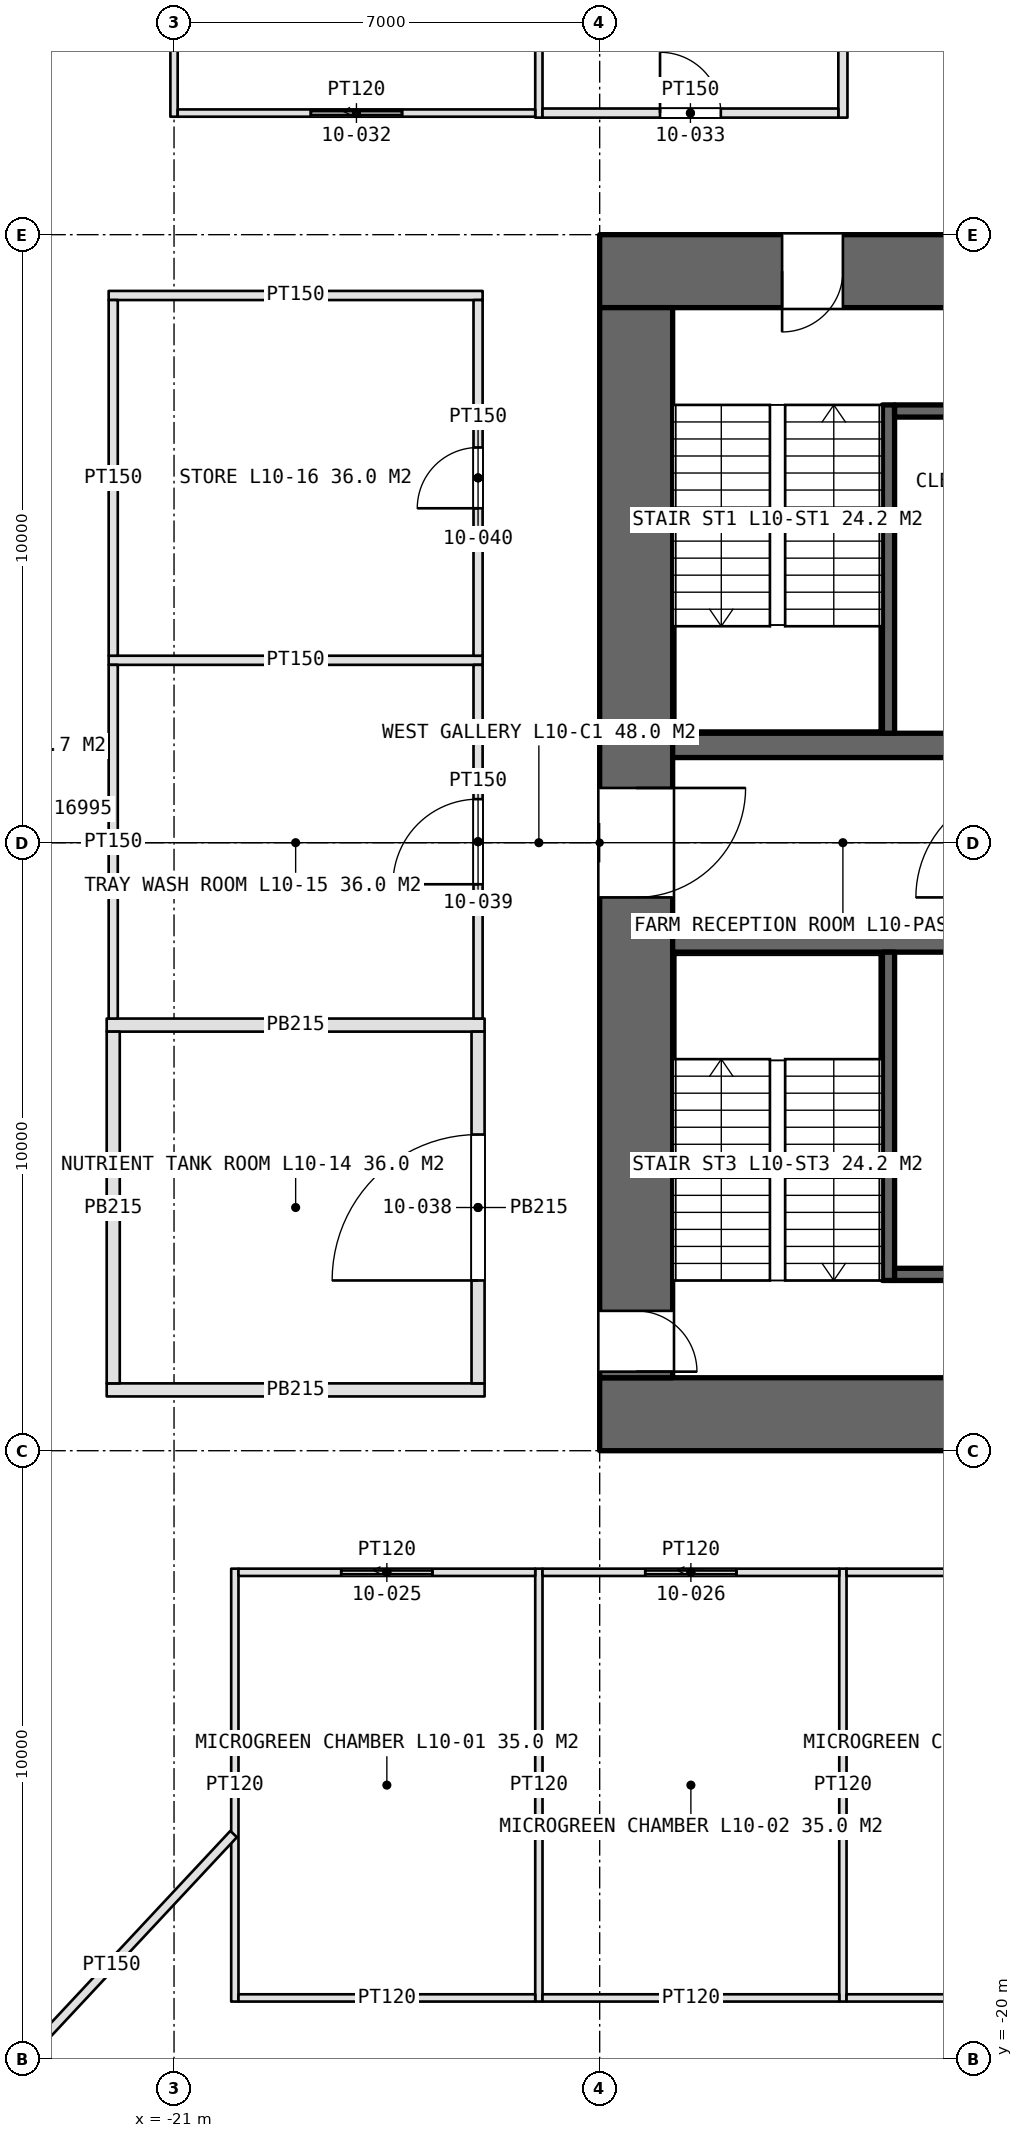
"""IFC4 building model, lengths in metres.
Left out: names, types, materials, properties, quantities, classifications, styles, units other than length and angle.
Written with IfcOpenShell. Run it as: python <this file> out.ifc"""

import sys

from ifc_helpers import new_model, si_unit, direction, frame, frame_2d, origin, place, context, subcontext, project, spatial, rectangle, extrude, element, fill, save


model = new_model("IFC4")
c1 = context("Model", 3, precision=1e-05, world=origin(), true_north=direction((0.0, 1.0)))
c2 = subcontext(c1, "Body", "Model", "MODEL_VIEW")
j1 = project(units=[si_unit("LENGTHUNIT", "METRE"), si_unit("PLANEANGLEUNIT", "RADIAN")], contexts=[c1])
p1 = place(None, origin())
s1 = spatial("IfcSite", under=j1, at=p1, CompositionType="ELEMENT")
p2 = place(p1, origin())
s2 = spatial("IfcBuilding", under=s1, at=p2, CompositionType="ELEMENT")
p3 = place(p2, frame((0.0, 0.0, 50.0)))
s3 = spatial("IfcBuildingStorey", under=s2, at=p3, CompositionType="ELEMENT", Elevation=50.0)
p4 = place(p3, frame((-14.0, -9.4, 0.0), z_axis=(0.0, 0.0, 1.0), x_axis=(1.0, 0.0, 0.0)))
e1 = element("IfcWall", 1, at=p4, inside=s3, PredefinedType="SHEAR", context=c2, shape_type="SweptSolid", body=[
    extrude(rectangle(XDim=28.0, YDim=1.2, at=frame_2d((14.0, 0.0))), origin(), (0.0, 0.0, 1.0), 5.0),
])
p5 = place(p4, frame((13.1, 0.0, 0.0)))
e2 = element("IfcOpeningElement", 2, at=p5, cuts=e1, PredefinedType="OPENING", context=c2, shape_type="SweptSolid", body=[
    extrude(rectangle(XDim=1.8, YDim=2.4, at=frame_2d((0.9, 1.2))), frame((0.0, 0.61, 0.0), z_axis=(0.0, -1.0, 0.0), x_axis=(1.0, 0.0, 0.0)), (0.0, 0.0, 1.0), 1.22),
])
p6 = place(p4, frame((22.9, 0.0, 0.0)))
e3 = element("IfcOpeningElement", 3, at=p6, cuts=e1, PredefinedType="OPENING", context=c2, shape_type="SweptSolid", body=[
    extrude(rectangle(XDim=2.2, YDim=2.7, at=frame_2d((1.1, 1.35))), frame((0.0, 0.61, 0.0), z_axis=(0.0, -1.0, 0.0), x_axis=(1.0, 0.0, 0.0)), (0.0, 0.0, 1.0), 1.22),
])
p7 = place(p3, frame((14.0, 9.4, 0.0), z_axis=(0.0, 0.0, 1.0), x_axis=(-1.0, 0.0, 0.0)))
e4 = element("IfcWall", 4, at=p7, inside=s3, PredefinedType="SHEAR", context=c2, shape_type="SweptSolid", body=[
    extrude(rectangle(XDim=28.0, YDim=1.2, at=frame_2d((14.0, 0.0))), origin(), (0.0, 0.0, 1.0), 5.0),
])
p8 = place(p7, frame((24.0, 0.0, 0.0)))
e5 = element("IfcOpeningElement", 5, at=p8, cuts=e4, PredefinedType="OPENING", context=c2, shape_type="SweptSolid", body=[
    extrude(rectangle(XDim=1.0, YDim=2.4, at=frame_2d((0.5, 1.2))), frame((0.0, 0.61, 0.0), z_axis=(0.0, -1.0, 0.0), x_axis=(1.0, 0.0, 0.0)), (0.0, 0.0, 1.0), 1.22),
])
p9 = place(p7, frame((13.1, 0.0, 0.0)))
e6 = element("IfcOpeningElement", 6, at=p9, cuts=e4, PredefinedType="OPENING", context=c2, shape_type="SweptSolid", body=[
    extrude(rectangle(XDim=1.8, YDim=2.4, at=frame_2d((0.9, 1.2))), frame((0.0, 0.61, 0.0), z_axis=(0.0, -1.0, 0.0), x_axis=(1.0, 0.0, 0.0)), (0.0, 0.0, 1.0), 1.22),
])
p10 = place(p3, frame((-13.4, 8.8, 0.0), z_axis=(0.0, 0.0, 1.0), x_axis=(0.0, -1.0, 0.0)))
e7 = element("IfcWall", 7, at=p10, inside=s3, PredefinedType="SHEAR", context=c2, shape_type="SweptSolid", body=[
    extrude(rectangle(XDim=17.6, YDim=1.2, at=frame_2d((8.8, 0.0))), origin(), (0.0, 0.0, 1.0), 5.0),
])
p11 = place(p10, frame((7.9, 0.0, 0.0)))
e8 = element("IfcOpeningElement", 8, at=p11, cuts=e7, PredefinedType="OPENING", context=c2, shape_type="SweptSolid", body=[
    extrude(rectangle(XDim=1.8, YDim=2.4, at=frame_2d((0.9, 1.2))), frame((0.0, 0.61, 0.0), z_axis=(0.0, -1.0, 0.0), x_axis=(1.0, 0.0, 0.0)), (0.0, 0.0, 1.0), 1.22),
])
p12 = place(p10, frame((16.5, 0.0, 0.0)))
e9 = element("IfcOpeningElement", 9, at=p12, cuts=e7, PredefinedType="OPENING", context=c2, shape_type="SweptSolid", body=[
    extrude(rectangle(XDim=1.0, YDim=2.4, at=frame_2d((0.5, 1.2))), frame((0.0, 0.61, 0.0), z_axis=(0.0, -1.0, 0.0), x_axis=(1.0, 0.0, 0.0)), (0.0, 0.0, 1.0), 1.22),
])
for number, where, z_axis, x_axis in (
    (10, (-12.8, 1.6, 0.0), (0.0, 0.0, 1.0), (1.0, 0.0, 0.0)),
    (11, (-12.8, -1.6, 0.0), (0.0, 0.0, 1.0), (1.0, 0.0, 0.0)),
):
    element("IfcWall", number, at=place(p3, frame(where, z_axis=z_axis, x_axis=x_axis)), inside=s3, PredefinedType="SHEAR", context=c2, shape_type="SweptSolid", body=[
        extrude(rectangle(XDim=5.6, YDim=0.4, at=frame_2d((2.8, 0.0))), origin(), (0.0, 0.0, 1.0), 5.0),
    ])
p13 = place(p3, frame((-9.25, 7.2, 0.0), z_axis=(0.0, 0.0, 1.0), x_axis=(0.0, -1.0, 0.0)))
e12 = element("IfcWall", 12, at=p13, inside=s3, PredefinedType="SOLIDWALL", context=c2, shape_type="SweptSolid", body=[
    extrude(rectangle(XDim=5.4, YDim=0.2, at=frame_2d((2.7, 0.0))), origin(), (0.0, 0.0, 1.0), 5.0),
])
p14 = place(p3, frame((-9.15, 7.1, 0.0), z_axis=(0.0, 0.0, 1.0), x_axis=(1.0, 0.0, 0.0)))
e13 = element("IfcWall", 13, at=p14, inside=s3, PredefinedType="SOLIDWALL", context=c2, shape_type="SweptSolid", body=[
    extrude(rectangle(XDim=1.95, YDim=0.2, at=frame_2d((0.975, 0.0))), origin(), (0.0, 0.0, 1.0), 5.0),
])
p15 = place(p3, frame((-9.25, -7.2, 0.0), z_axis=(0.0, 0.0, 1.0), x_axis=(0.0, 1.0, 0.0)))
e14 = element("IfcWall", 14, at=p15, inside=s3, PredefinedType="SOLIDWALL", context=c2, shape_type="SweptSolid", body=[
    extrude(rectangle(XDim=5.4, YDim=0.2, at=frame_2d((2.7, 0.0))), origin(), (0.0, 0.0, 1.0), 5.0),
])
p16 = place(p3, frame((-9.15, -7.1, 0.0), z_axis=(0.0, 0.0, 1.0), x_axis=(1.0, 0.0, 0.0)))
e15 = element("IfcWall", 15, at=p16, inside=s3, PredefinedType="SOLIDWALL", context=c2, shape_type="SweptSolid", body=[
    extrude(rectangle(XDim=1.95, YDim=0.2, at=frame_2d((0.975, 0.0))), origin(), (0.0, 0.0, 1.0), 5.0),
])
for number, where, z_axis, x_axis in (
    (16, (-20.0, -11.94, 0.0), (0.0, 0.0, 1.0), (0.0, -1.0, 0.0)),
    (17, (-15.0, -11.94, 0.0), (0.0, 0.0, 1.0), (0.0, -1.0, 0.0)),
    (18, (-10.0, -11.94, 0.0), (0.0, 0.0, 1.0), (0.0, -1.0, 0.0)),
):
    element("IfcWall", number, at=place(p3, frame(where, z_axis=z_axis, x_axis=x_axis)), inside=s3, PredefinedType="PARTITIONING", context=c2, shape_type="SweptSolid", body=[
        extrude(rectangle(XDim=7.12, YDim=0.12, at=frame_2d((3.56, 0.0))), origin(), (0.0, 0.0, 1.0), 3.6),
    ])
p17 = place(p3, frame((-19.94, -12.0, 0.0), z_axis=(0.0, 0.0, 1.0), x_axis=(1.0, 0.0, 0.0)))
e19 = element("IfcWall", 19, at=p17, inside=s3, PredefinedType="PARTITIONING", context=c2, shape_type="SweptSolid", body=[
    extrude(rectangle(XDim=4.88, YDim=0.12, at=frame_2d((2.44, 0.0))), origin(), (0.0, 0.0, 1.0), 3.6),
])
p18 = place(p17, frame((1.69, 0.0, 0.0)))
e20 = element("IfcOpeningElement", 20, at=p18, cuts=e19, PredefinedType="OPENING", context=c2, shape_type="SweptSolid", body=[
    extrude(rectangle(XDim=1.5, YDim=2.5, at=frame_2d((0.75, 1.25))), frame((0.0, 0.07, 0.0), z_axis=(0.0, -1.0, 0.0), x_axis=(1.0, 0.0, 0.0)), (0.0, 0.0, 1.0), 0.14),
])
p19 = place(p3, frame((-19.94, -19.0, 0.0), z_axis=(0.0, 0.0, 1.0), x_axis=(1.0, 0.0, 0.0)))
e21 = element("IfcWall", 21, at=p19, inside=s3, PredefinedType="PARTITIONING", context=c2, shape_type="SweptSolid", body=[
    extrude(rectangle(XDim=4.88, YDim=0.12, at=frame_2d((2.44, 0.0))), origin(), (0.0, 0.0, 1.0), 3.6),
])
p20 = place(p3, frame((-14.94, -12.0, 0.0), z_axis=(0.0, 0.0, 1.0), x_axis=(1.0, 0.0, 0.0)))
e22 = element("IfcWall", 22, at=p20, inside=s3, PredefinedType="PARTITIONING", context=c2, shape_type="SweptSolid", body=[
    extrude(rectangle(XDim=4.88, YDim=0.12, at=frame_2d((2.44, 0.0))), origin(), (0.0, 0.0, 1.0), 3.6),
])
p21 = place(p20, frame((1.69, 0.0, 0.0)))
e23 = element("IfcOpeningElement", 23, at=p21, cuts=e22, PredefinedType="OPENING", context=c2, shape_type="SweptSolid", body=[
    extrude(rectangle(XDim=1.5, YDim=2.5, at=frame_2d((0.75, 1.25))), frame((0.0, 0.07, 0.0), z_axis=(0.0, -1.0, 0.0), x_axis=(1.0, 0.0, 0.0)), (0.0, 0.0, 1.0), 0.14),
])
p22 = place(p3, frame((-14.94, -19.0, 0.0), z_axis=(0.0, 0.0, 1.0), x_axis=(1.0, 0.0, 0.0)))
e24 = element("IfcWall", 24, at=p22, inside=s3, PredefinedType="PARTITIONING", context=c2, shape_type="SweptSolid", body=[
    extrude(rectangle(XDim=4.88, YDim=0.12, at=frame_2d((2.44, 0.0))), origin(), (0.0, 0.0, 1.0), 3.6),
])
p23 = place(p3, frame((-9.94, -12.0, 0.0), z_axis=(0.0, 0.0, 1.0), x_axis=(1.0, 0.0, 0.0)))
e25 = element("IfcWall", 25, at=p23, inside=s3, PredefinedType="PARTITIONING", context=c2, shape_type="SweptSolid", body=[
    extrude(rectangle(XDim=4.88, YDim=0.12, at=frame_2d((2.44, 0.0))), origin(), (0.0, 0.0, 1.0), 3.6),
])
p24 = place(p23, frame((1.69, 0.0, 0.0)))
e26 = element("IfcOpeningElement", 26, at=p24, cuts=e25, PredefinedType="OPENING", context=c2, shape_type="SweptSolid", body=[
    extrude(rectangle(XDim=1.5, YDim=2.5, at=frame_2d((0.75, 1.25))), frame((0.0, 0.07, 0.0), z_axis=(0.0, -1.0, 0.0), x_axis=(1.0, 0.0, 0.0)), (0.0, 0.0, 1.0), 0.14),
])
p25 = place(p3, frame((-9.94, -19.0, 0.0), z_axis=(0.0, 0.0, 1.0), x_axis=(1.0, 0.0, 0.0)))
e27 = element("IfcWall", 27, at=p25, inside=s3, PredefinedType="PARTITIONING", context=c2, shape_type="SweptSolid", body=[
    extrude(rectangle(XDim=4.88, YDim=0.12, at=frame_2d((2.44, 0.0))), origin(), (0.0, 0.0, 1.0), 3.6),
])
p26 = place(p3, frame((-21.0, 11.94, 0.0), z_axis=(0.0, 0.0, 1.0), x_axis=(0.0, 1.0, 0.0)))
e28 = element("IfcWall", 28, at=p26, inside=s3, PredefinedType="PARTITIONING", context=c2, shape_type="SweptSolid", body=[
    extrude(rectangle(XDim=6.12, YDim=0.12, at=frame_2d((3.06, 0.0))), origin(), (0.0, 0.0, 1.0), 3.6),
])
p27 = place(p3, frame((-15.0, 11.925, 0.0), z_axis=(0.0, 0.0, 1.0), x_axis=(0.0, 1.0, 0.0)))
e29 = element("IfcWall", 29, at=p27, inside=s3, PredefinedType="PARTITIONING", context=c2, shape_type="SweptSolid", body=[
    extrude(rectangle(XDim=6.15, YDim=0.12, at=frame_2d((3.075, 0.0))), origin(), (0.0, 0.0, 1.0), 3.6),
])
p28 = place(p3, frame((-10.0, 11.925, 0.0), z_axis=(0.0, 0.0, 1.0), x_axis=(0.0, 1.0, 0.0)))
e30 = element("IfcWall", 30, at=p28, inside=s3, PredefinedType="PARTITIONING", context=c2, shape_type="SweptSolid", body=[
    extrude(rectangle(XDim=6.15, YDim=0.15, at=frame_2d((3.075, 0.0))), origin(), (0.0, 0.0, 1.0), 3.6),
])
p29 = place(p3, frame((-20.94, 12.0, 0.0), z_axis=(0.0, 0.0, 1.0), x_axis=(1.0, 0.0, 0.0)))
e31 = element("IfcWall", 31, at=p29, inside=s3, PredefinedType="PARTITIONING", context=c2, shape_type="SweptSolid", body=[
    extrude(rectangle(XDim=5.88, YDim=0.12, at=frame_2d((2.94, 0.0))), origin(), (0.0, 0.0, 1.0), 3.6),
])
p30 = place(p29, frame((2.19, 0.0, 0.0)))
e32 = element("IfcOpeningElement", 32, at=p30, cuts=e31, PredefinedType="OPENING", context=c2, shape_type="SweptSolid", body=[
    extrude(rectangle(XDim=1.5, YDim=2.5, at=frame_2d((0.75, 1.25))), frame((0.0, 0.07, 0.0), z_axis=(0.0, -1.0, 0.0), x_axis=(1.0, 0.0, 0.0)), (0.0, 0.0, 1.0), 0.14),
])
p31 = place(p3, frame((-14.94, 12.0, 0.0), z_axis=(0.0, 0.0, 1.0), x_axis=(1.0, 0.0, 0.0)))
e33 = element("IfcWall", 33, at=p31, inside=s3, PredefinedType="PARTITIONING", context=c2, shape_type="SweptSolid", body=[
    extrude(rectangle(XDim=4.865, YDim=0.15, at=frame_2d((2.433, 0.0))), origin(), (0.0, 0.0, 1.0), 3.6),
])
p32 = place(p31, frame((1.933, 0.0, 0.0)))
e34 = element("IfcOpeningElement", 34, at=p32, cuts=e33, PredefinedType="OPENING", context=c2, shape_type="SweptSolid", body=[
    extrude(rectangle(XDim=1.0, YDim=2.2, at=frame_2d((0.5, 1.1))), frame((0.0, 0.085, 0.0), z_axis=(0.0, -1.0, 0.0), x_axis=(1.0, 0.0, 0.0)), (0.0, 0.0, 1.0), 0.17),
])
for number, where, z_axis, x_axis in (
    (35, (-15.893, -9.0, 0.0), (0.0, 0.0, 1.0), (-1.0, 0.0, 0.0)),
    (36, (-15.893, -3.0, 0.0), (0.0, 0.0, 1.0), (-1.0, 0.0, 0.0)),
):
    element("IfcWall", number, at=place(p3, frame(where, z_axis=z_axis, x_axis=x_axis)), inside=s3, PredefinedType="PARTITIONING", context=c2, shape_type="SweptSolid", body=[
        extrude(rectangle(XDim=6.215, YDim=0.215, at=frame_2d((3.107, 0.0))), origin(), (0.0, 0.0, 1.0), 3.6),
    ])
for number, where, z_axis, x_axis in (
    (37, (-15.925, 3.0, 0.0), (0.0, 0.0, 1.0), (-1.0, 0.0, 0.0)),
    (38, (-15.925, 9.0, 0.0), (0.0, 0.0, 1.0), (-1.0, 0.0, 0.0)),
):
    element("IfcWall", number, at=place(p3, frame(where, z_axis=z_axis, x_axis=x_axis)), inside=s3, PredefinedType="PARTITIONING", context=c2, shape_type="SweptSolid", body=[
        extrude(rectangle(XDim=6.15, YDim=0.15, at=frame_2d((3.075, 0.0))), origin(), (0.0, 0.0, 1.0), 3.6),
    ])
p33 = place(p3, frame((-16.0, -8.893, 0.0), z_axis=(0.0, 0.0, 1.0), x_axis=(0.0, 1.0, 0.0)))
e39 = element("IfcWall", 39, at=p33, inside=s3, PredefinedType="PARTITIONING", context=c2, shape_type="SweptSolid", body=[
    extrude(rectangle(XDim=5.785, YDim=0.215, at=frame_2d((2.893, 0.0))), origin(), (0.0, 0.0, 1.0), 3.6),
])
p34 = place(p33, frame((1.692, 0.0, 0.0)))
e40 = element("IfcOpeningElement", 40, at=p34, cuts=e39, PredefinedType="OPENING", context=c2, shape_type="SweptSolid", body=[
    extrude(rectangle(XDim=2.4, YDim=2.4, at=frame_2d((1.2, 1.2))), frame((0.0, 0.118, 0.0), z_axis=(0.0, -1.0, 0.0), x_axis=(1.0, 0.0, 0.0)), (0.0, 0.0, 1.0), 0.235),
])
p35 = place(p3, frame((-22.0, -8.893, 0.0), z_axis=(0.0, 0.0, 1.0), x_axis=(0.0, 1.0, 0.0)))
e41 = element("IfcWall", 41, at=p35, inside=s3, PredefinedType="PARTITIONING", context=c2, shape_type="SweptSolid", body=[
    extrude(rectangle(XDim=5.785, YDim=0.215, at=frame_2d((2.893, 0.0))), origin(), (0.0, 0.0, 1.0), 3.6),
])
p36 = place(p3, frame((-16.0, -2.893, 0.0), z_axis=(0.0, 0.0, 1.0), x_axis=(0.0, 1.0, 0.0)))
e42 = element("IfcWall", 42, at=p36, inside=s3, PredefinedType="PARTITIONING", context=c2, shape_type="SweptSolid", body=[
    extrude(rectangle(XDim=5.818, YDim=0.15, at=frame_2d((2.909, 0.0))), origin(), (0.0, 0.0, 1.0), 3.6),
])
p37 = place(p36, frame((2.209, 0.0, 0.0)))
e43 = element("IfcOpeningElement", 43, at=p37, cuts=e42, PredefinedType="OPENING", context=c2, shape_type="SweptSolid", body=[
    extrude(rectangle(XDim=1.4, YDim=2.4, at=frame_2d((0.7, 1.2))), frame((0.0, 0.085, 0.0), z_axis=(0.0, -1.0, 0.0), x_axis=(1.0, 0.0, 0.0)), (0.0, 0.0, 1.0), 0.17),
])
p38 = place(p3, frame((-22.0, -2.893, 0.0), z_axis=(0.0, 0.0, 1.0), x_axis=(0.0, 1.0, 0.0)))
e44 = element("IfcWall", 44, at=p38, inside=s3, PredefinedType="PARTITIONING", context=c2, shape_type="SweptSolid", body=[
    extrude(rectangle(XDim=5.818, YDim=0.15, at=frame_2d((2.909, 0.0))), origin(), (0.0, 0.0, 1.0), 3.6),
])
p39 = place(p3, frame((-16.0, 3.075, 0.0), z_axis=(0.0, 0.0, 1.0), x_axis=(0.0, 1.0, 0.0)))
e45 = element("IfcWall", 45, at=p39, inside=s3, PredefinedType="PARTITIONING", context=c2, shape_type="SweptSolid", body=[
    extrude(rectangle(XDim=5.85, YDim=0.15, at=frame_2d((2.925, 0.0))), origin(), (0.0, 0.0, 1.0), 3.6),
])
p40 = place(p39, frame((2.425, 0.0, 0.0)))
e46 = element("IfcOpeningElement", 46, at=p40, cuts=e45, PredefinedType="OPENING", context=c2, shape_type="SweptSolid", body=[
    extrude(rectangle(XDim=1.0, YDim=2.2, at=frame_2d((0.5, 1.1))), frame((0.0, 0.085, 0.0), z_axis=(0.0, -1.0, 0.0), x_axis=(1.0, 0.0, 0.0)), (0.0, 0.0, 1.0), 0.17),
])
p41 = place(p3, frame((-22.0, 3.075, 0.0), z_axis=(0.0, 0.0, 1.0), x_axis=(0.0, 1.0, 0.0)))
e47 = element("IfcWall", 47, at=p41, inside=s3, PredefinedType="PARTITIONING", context=c2, shape_type="SweptSolid", body=[
    extrude(rectangle(XDim=5.85, YDim=0.15, at=frame_2d((2.925, 0.0))), origin(), (0.0, 0.0, 1.0), 3.6),
])
p42 = place(p3, frame((-20.02, -16.305, 0.0), z_axis=(0.0, 0.0, 1.0), x_axis=(-0.682516386928, -0.730870290527, 0.0)))
e48 = element("IfcWall", 48, at=p42, inside=s3, PredefinedType="PARTITIONING", context=c2, shape_type="SweptSolid", body=[
    extrude(rectangle(XDim=5.882, YDim=0.15, at=frame_2d((2.941, 0.0))), origin(), (0.0, 0.0, 1.0), 3.6),
])
p43 = place(p11, origin())
e49 = element("IfcDoor", 49, at=p43, inside=s3, OperationType="DOUBLE_DOOR_SINGLE_SWING", PredefinedType="DOOR", context=c2, shape_type="SweptSolid", body=[
    extrude(rectangle(XDim=1.8, YDim=2.4, at=frame_2d((0.9, 1.2))), frame((0.0, 0.025, 0.0), z_axis=(0.0, -1.0, 0.0), x_axis=(1.0, 0.0, 0.0)), (0.0, 0.0, 1.0), 0.05),
])
fill(e8, e49)
p44 = place(p8, origin())
e50 = element("IfcDoor", 50, at=p44, inside=s3, OperationType="SINGLE_SWING_RIGHT", PredefinedType="DOOR", context=c2, shape_type="SweptSolid", body=[
    extrude(rectangle(XDim=1.0, YDim=2.4, at=frame_2d((0.5, 1.2))), frame((0.0, 0.025, 0.0), z_axis=(0.0, -1.0, 0.0), x_axis=(1.0, 0.0, 0.0)), (0.0, 0.0, 1.0), 0.05),
])
fill(e5, e50)
p45 = place(p12, origin())
e51 = element("IfcDoor", 51, at=p45, inside=s3, OperationType="SINGLE_SWING_RIGHT", PredefinedType="DOOR", context=c2, shape_type="SweptSolid", body=[
    extrude(rectangle(XDim=1.0, YDim=2.4, at=frame_2d((0.5, 1.2))), frame((0.0, 0.025, 0.0), z_axis=(0.0, -1.0, 0.0), x_axis=(1.0, 0.0, 0.0)), (0.0, 0.0, 1.0), 0.05),
])
fill(e9, e51)
p46 = place(p18, origin())
e52 = element("IfcDoor", 52, at=p46, inside=s3, OperationType="SLIDING_TO_LEFT", PredefinedType="DOOR", context=c2, shape_type="SweptSolid", body=[
    extrude(rectangle(XDim=1.5, YDim=2.5, at=frame_2d((0.75, 1.25))), frame((0.0, 0.025, 0.0), z_axis=(0.0, -1.0, 0.0), x_axis=(1.0, 0.0, 0.0)), (0.0, 0.0, 1.0), 0.05),
])
fill(e20, e52)
p47 = place(p21, origin())
e53 = element("IfcDoor", 53, at=p47, inside=s3, OperationType="SLIDING_TO_LEFT", PredefinedType="DOOR", context=c2, shape_type="SweptSolid", body=[
    extrude(rectangle(XDim=1.5, YDim=2.5, at=frame_2d((0.75, 1.25))), frame((0.0, 0.025, 0.0), z_axis=(0.0, -1.0, 0.0), x_axis=(1.0, 0.0, 0.0)), (0.0, 0.0, 1.0), 0.05),
])
fill(e23, e53)
p48 = place(p30, origin())
e54 = element("IfcDoor", 54, at=p48, inside=s3, OperationType="SLIDING_TO_LEFT", PredefinedType="DOOR", context=c2, shape_type="SweptSolid", body=[
    extrude(rectangle(XDim=1.5, YDim=2.5, at=frame_2d((0.75, 1.25))), frame((0.0, 0.025, 0.0), z_axis=(0.0, -1.0, 0.0), x_axis=(1.0, 0.0, 0.0)), (0.0, 0.0, 1.0), 0.05),
])
fill(e32, e54)
p49 = place(p32, origin())
e55 = element("IfcDoor", 55, at=p49, inside=s3, OperationType="SINGLE_SWING_LEFT", PredefinedType="DOOR", context=c2, shape_type="SweptSolid", body=[
    extrude(rectangle(XDim=1.0, YDim=2.2, at=frame_2d((0.5, 1.1))), frame((0.0, 0.025, 0.0), z_axis=(0.0, -1.0, 0.0), x_axis=(1.0, 0.0, 0.0)), (0.0, 0.0, 1.0), 0.05),
])
fill(e34, e55)
p50 = place(p34, origin())
e56 = element("IfcDoor", 56, at=p50, inside=s3, OperationType="DOUBLE_DOOR_SINGLE_SWING", PredefinedType="DOOR", context=c2, shape_type="SweptSolid", body=[
    extrude(rectangle(XDim=2.4, YDim=2.4, at=frame_2d((1.2, 1.2))), frame((0.0, 0.025, 0.0), z_axis=(0.0, -1.0, 0.0), x_axis=(1.0, 0.0, 0.0)), (0.0, 0.0, 1.0), 0.05),
])
fill(e40, e56)
p51 = place(p37, origin())
e57 = element("IfcDoor", 57, at=p51, inside=s3, OperationType="DOUBLE_DOOR_DOUBLE_SWING", PredefinedType="DOOR", context=c2, shape_type="SweptSolid", body=[
    extrude(rectangle(XDim=1.4, YDim=2.4, at=frame_2d((0.7, 1.2))), frame((0.0, 0.025, 0.0), z_axis=(0.0, -1.0, 0.0), x_axis=(1.0, 0.0, 0.0)), (0.0, 0.0, 1.0), 0.05),
])
fill(e43, e57)
p52 = place(p40, origin())
e58 = element("IfcDoor", 58, at=p52, inside=s3, OperationType="SINGLE_SWING_LEFT", PredefinedType="DOOR", context=c2, shape_type="SweptSolid", body=[
    extrude(rectangle(XDim=1.0, YDim=2.2, at=frame_2d((0.5, 1.1))), frame((0.0, 0.025, 0.0), z_axis=(0.0, -1.0, 0.0), x_axis=(1.0, 0.0, 0.0)), (0.0, 0.0, 1.0), 0.05),
])
fill(e46, e58)
save(model, sys.argv[1])
